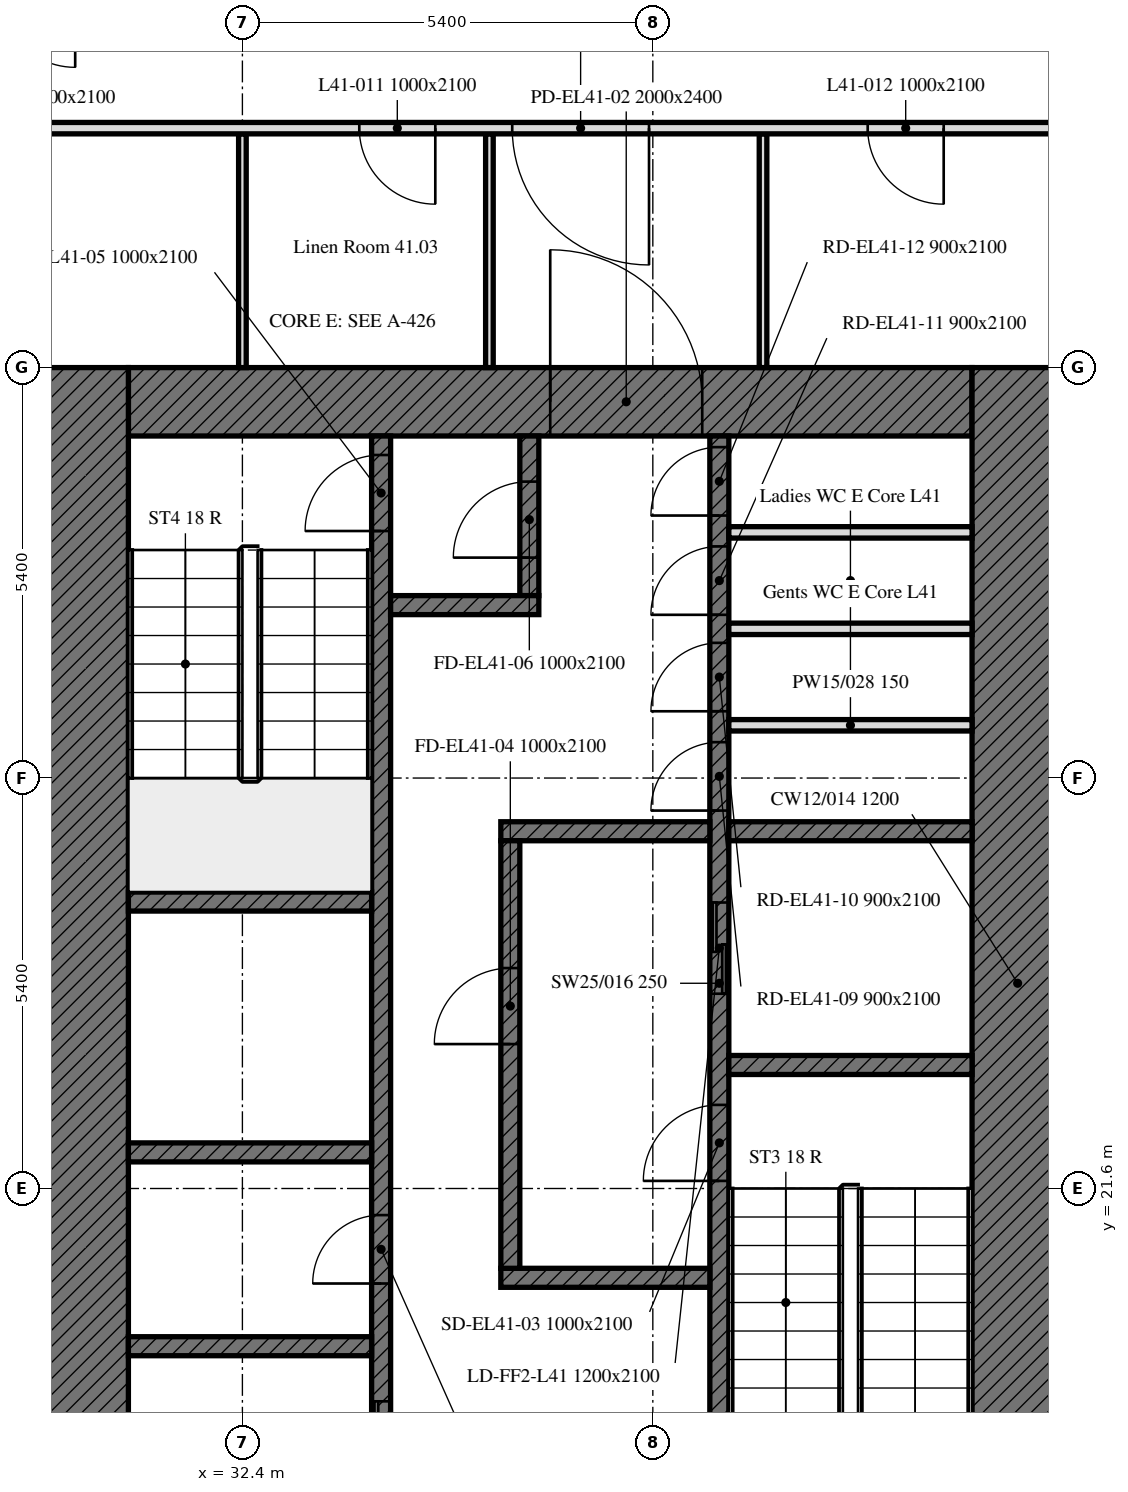
"""IFC4 building model, lengths in metres.
Left out: names, types, materials, properties, quantities, classifications, styles, units other than length and angle.
Written with IfcOpenShell. Run it as: python <this file> out.ifc"""

import sys

from ifc_helpers import new_model, si_unit, direction, frame, frame_2d, origin, place, context, subcontext, project, spatial, rectangle, extrude, element, fill, save


model = new_model("IFC4")
c1 = context("Model", 3, precision=1e-05, world=origin(), true_north=direction((0.0, 1.0)))
c2 = subcontext(c1, "Body", "Model", "MODEL_VIEW")
j1 = project(units=[si_unit("LENGTHUNIT", "METRE"), si_unit("PLANEANGLEUNIT", "RADIAN")], contexts=[c1])
p1 = place(None, origin())
s1 = spatial("IfcSite", under=j1, at=p1, CompositionType="ELEMENT")
p2 = place(p1, origin())
s2 = spatial("IfcBuilding", under=s1, at=p2, CompositionType="ELEMENT")
p3 = place(p2, frame((0.0, 0.0, 172.6)))
s3 = spatial("IfcBuildingStorey", under=s2, at=p3, CompositionType="ELEMENT", Elevation=172.6)
p4 = place(p3, frame((30.9, 31.95, 0.0), z_axis=(0.0, 0.0, 1.0), x_axis=(1.0, 0.0, 0.0)))
e1 = element("IfcWall", 1, at=p4, inside=s3, PredefinedType="SOLIDWALL", context=c2, shape_type="SweptSolid", body=[
    extrude(rectangle(XDim=11.1, YDim=0.9, at=frame_2d((5.55, 0.0))), origin(), (0.0, 0.0, 1.0), 2.8),
])
p5 = place(p4, frame((5.55, 0.0, 0.0)))
e2 = element("IfcOpeningElement", 2, at=p5, cuts=e1, PredefinedType="OPENING", context=c2, shape_type="SweptSolid", body=[
    extrude(rectangle(XDim=2.0, YDim=2.4, at=frame_2d((1.0, 1.2))), frame((0.0, 0.45, 0.0), z_axis=(0.0, -1.0, 0.0), x_axis=(1.0, 0.0, 0.0)), (0.0, 0.0, 1.0), 0.9),
])
for number, where, z_axis, x_axis in (
    (3, (42.6, 32.4, 0.0), (0.0, 0.0, 1.0), (0.0, -1.0, 0.0)),
    (4, (30.3, 16.2, 0.0), (0.0, 0.0, 1.0), (0.0, 1.0, 0.0)),
):
    element("IfcWall", number, at=place(p3, frame(where, z_axis=z_axis, x_axis=x_axis)), inside=s3, PredefinedType="SOLIDWALL", context=c2, shape_type="SweptSolid", body=[
        extrude(rectangle(XDim=16.2, YDim=1.2, at=frame_2d((8.1, 0.0))), origin(), (0.0, 0.0, 1.0), 2.8),
    ])
p6 = place(p3, frame((38.675, 17.1, 0.0), z_axis=(0.0, 0.0, 1.0), x_axis=(0.0, 1.0, 0.0)))
e5 = element("IfcWall", 5, at=p6, inside=s3, PredefinedType="SOLIDWALL", context=c2, shape_type="SweptSolid", body=[
    extrude(rectangle(XDim=14.4, YDim=0.25, at=frame_2d((7.2, 0.0))), origin(), (0.0, 0.0, 1.0), 2.8),
])
p7 = place(p6, frame((4.6, 0.0, 0.0)))
e6 = element("IfcOpeningElement", 6, at=p7, cuts=e5, PredefinedType="OPENING", context=c2, shape_type="SweptSolid", body=[
    extrude(rectangle(XDim=1.0, YDim=2.1, at=frame_2d((0.5, 1.05))), frame((0.0, 0.125, 0.0), z_axis=(0.0, -1.0, 0.0), x_axis=(1.0, 0.0, 0.0)), (0.0, 0.0, 1.0), 0.25),
])
p8 = place(p6, frame((7.062, 0.0, 0.0)))
e7 = element("IfcOpeningElement", 7, at=p8, cuts=e5, PredefinedType="OPENING", context=c2, shape_type="SweptSolid", body=[
    extrude(rectangle(XDim=1.2, YDim=2.1, at=frame_2d((0.6, 1.05))), frame((0.0, 0.125, 0.0), z_axis=(0.0, -1.0, 0.0), x_axis=(1.0, 0.0, 0.0)), (0.0, 0.0, 1.0), 0.25),
])
p9 = place(p6, frame((9.472, 0.0, 0.0)))
e8 = element("IfcOpeningElement", 8, at=p9, cuts=e5, PredefinedType="OPENING", context=c2, shape_type="SweptSolid", body=[
    extrude(rectangle(XDim=0.9, YDim=2.1, at=frame_2d((0.45, 1.05))), frame((0.0, 0.125, 0.0), z_axis=(0.0, -1.0, 0.0), x_axis=(1.0, 0.0, 0.0)), (0.0, 0.0, 1.0), 0.25),
])
p10 = place(p6, frame((10.779, 0.0, 0.0)))
e9 = element("IfcOpeningElement", 9, at=p10, cuts=e5, PredefinedType="OPENING", context=c2, shape_type="SweptSolid", body=[
    extrude(rectangle(XDim=0.9, YDim=2.1, at=frame_2d((0.45, 1.05))), frame((0.0, 0.125, 0.0), z_axis=(0.0, -1.0, 0.0), x_axis=(1.0, 0.0, 0.0)), (0.0, 0.0, 1.0), 0.25),
])
p11 = place(p6, frame((12.048, 0.0, 0.0)))
e10 = element("IfcOpeningElement", 10, at=p11, cuts=e5, PredefinedType="OPENING", context=c2, shape_type="SweptSolid", body=[
    extrude(rectangle(XDim=0.9, YDim=2.1, at=frame_2d((0.45, 1.05))), frame((0.0, 0.125, 0.0), z_axis=(0.0, -1.0, 0.0), x_axis=(1.0, 0.0, 0.0)), (0.0, 0.0, 1.0), 0.25),
])
p12 = place(p6, frame((13.354, 0.0, 0.0)))
e11 = element("IfcOpeningElement", 11, at=p12, cuts=e5, PredefinedType="OPENING", context=c2, shape_type="SweptSolid", body=[
    extrude(rectangle(XDim=0.9, YDim=2.1, at=frame_2d((0.45, 1.05))), frame((0.0, 0.125, 0.0), z_axis=(0.0, -1.0, 0.0), x_axis=(1.0, 0.0, 0.0)), (0.0, 0.0, 1.0), 0.25),
])
p13 = place(p3, frame((34.225, 17.1, 0.0), z_axis=(0.0, 0.0, 1.0), x_axis=(0.0, 1.0, 0.0)))
e12 = element("IfcWall", 12, at=p13, inside=s3, PredefinedType="SOLIDWALL", context=c2, shape_type="SweptSolid", body=[
    extrude(rectangle(XDim=14.4, YDim=0.25, at=frame_2d((7.2, 0.0))), origin(), (0.0, 0.0, 1.0), 2.8),
])
p14 = place(p13, frame((13.15, 0.0, 0.0)))
e13 = element("IfcOpeningElement", 13, at=p14, cuts=e12, PredefinedType="OPENING", context=c2, shape_type="SweptSolid", body=[
    extrude(rectangle(XDim=1.0, YDim=2.1, at=frame_2d((0.5, 1.05))), frame((0.0, 0.125, 0.0), z_axis=(0.0, -1.0, 0.0), x_axis=(1.0, 0.0, 0.0)), (0.0, 0.0, 1.0), 0.25),
])
p15 = place(p13, frame((0.6, 0.0, 0.0)))
e14 = element("IfcOpeningElement", 14, at=p15, cuts=e12, PredefinedType="OPENING", context=c2, shape_type="SweptSolid", body=[
    extrude(rectangle(XDim=1.1, YDim=2.1, at=frame_2d((0.55, 1.05))), frame((0.0, 0.125, 0.0), z_axis=(0.0, -1.0, 0.0), x_axis=(1.0, 0.0, 0.0)), (0.0, 0.0, 1.0), 0.25),
])
p16 = place(p13, frame((3.25, 0.0, 0.0)))
e15 = element("IfcOpeningElement", 15, at=p16, cuts=e12, PredefinedType="OPENING", context=c2, shape_type="SweptSolid", body=[
    extrude(rectangle(XDim=0.9, YDim=2.1, at=frame_2d((0.45, 1.05))), frame((0.0, 0.125, 0.0), z_axis=(0.0, -1.0, 0.0), x_axis=(1.0, 0.0, 0.0)), (0.0, 0.0, 1.0), 0.25),
])
p17 = place(p3, frame((38.8, 23.225, 0.0), z_axis=(0.0, 0.0, 1.0), x_axis=(1.0, 0.0, 0.0)))
e16 = element("IfcWall", 16, at=p17, inside=s3, PredefinedType="SOLIDWALL", context=c2, shape_type="SweptSolid", body=[
    extrude(rectangle(XDim=3.2, YDim=0.25, at=frame_2d((1.6, 0.0))), origin(), (0.0, 0.0, 1.0), 2.8),
])
for number, where, z_axis, x_axis in (
    (17, (30.9, 25.375, 0.0), (0.0, 0.0, 1.0), (1.0, 0.0, 0.0)),
    (18, (30.9, 22.075, 0.0), (0.0, 0.0, 1.0), (1.0, 0.0, 0.0)),
):
    element("IfcWall", number, at=place(p3, frame(where, z_axis=z_axis, x_axis=x_axis)), inside=s3, PredefinedType="SOLIDWALL", context=c2, shape_type="SweptSolid", body=[
        extrude(rectangle(XDim=3.2, YDim=0.25, at=frame_2d((1.6, 0.0))), origin(), (0.0, 0.0, 1.0), 2.8),
    ])
p18 = place(p3, frame((38.8, 26.3, 0.0), z_axis=(0.0, 0.0, 1.0), x_axis=(1.0, 0.0, 0.0)))
e19 = element("IfcWall", 19, at=p18, inside=s3, PredefinedType="SOLIDWALL", context=c2, shape_type="SweptSolid", body=[
    extrude(rectangle(XDim=3.2, YDim=0.25, at=frame_2d((1.6, 0.0))), origin(), (0.0, 0.0, 1.0), 2.8),
])
for number, where, z_axis, x_axis in (
    (20, (35.8, 26.3, 0.0), (0.0, 0.0, 1.0), (1.0, 0.0, 0.0)),
    (21, (35.8, 20.425, 0.0), (0.0, 0.0, 1.0), (1.0, 0.0, 0.0)),
):
    element("IfcWall", number, at=place(p3, frame(where, z_axis=z_axis, x_axis=x_axis)), inside=s3, PredefinedType="SOLIDWALL", context=c2, shape_type="SweptSolid", body=[
        extrude(rectangle(XDim=2.75, YDim=0.25, at=frame_2d((1.375, 0.0))), origin(), (0.0, 0.0, 1.0), 2.8),
    ])
p19 = place(p3, frame((36.175, 29.4, 0.0), z_axis=(0.0, 0.0, 1.0), x_axis=(0.0, 1.0, 0.0)))
e22 = element("IfcWall", 22, at=p19, inside=s3, PredefinedType="SOLIDWALL", context=c2, shape_type="SweptSolid", body=[
    extrude(rectangle(XDim=2.1, YDim=0.25, at=frame_2d((1.05, 0.0))), origin(), (0.0, 0.0, 1.0), 2.8),
])
p20 = place(p19, frame((0.5, 0.0, 0.0)))
e23 = element("IfcOpeningElement", 23, at=p20, cuts=e22, PredefinedType="OPENING", context=c2, shape_type="SweptSolid", body=[
    extrude(rectangle(XDim=1.0, YDim=2.1, at=frame_2d((0.5, 1.05))), frame((0.0, 0.125, 0.0), z_axis=(0.0, -1.0, 0.0), x_axis=(1.0, 0.0, 0.0)), (0.0, 0.0, 1.0), 0.25),
])
p21 = place(p3, frame((34.35, 29.275, 0.0), z_axis=(0.0, 0.0, 1.0), x_axis=(1.0, 0.0, 0.0)))
e24 = element("IfcWall", 24, at=p21, inside=s3, PredefinedType="SOLIDWALL", context=c2, shape_type="SweptSolid", body=[
    extrude(rectangle(XDim=1.95, YDim=0.25, at=frame_2d((0.975, 0.0))), origin(), (0.0, 0.0, 1.0), 2.8),
])
p22 = place(p3, frame((35.925, 20.55, 0.0), z_axis=(0.0, 0.0, 1.0), x_axis=(0.0, 1.0, 0.0)))
e25 = element("IfcWall", 25, at=p22, inside=s3, PredefinedType="SOLIDWALL", context=c2, shape_type="SweptSolid", body=[
    extrude(rectangle(XDim=5.625, YDim=0.25, at=frame_2d((2.812, 0.0))), origin(), (0.0, 0.0, 1.0), 2.8),
])
p23 = place(p22, frame((2.95, 0.0, 0.0)))
e26 = element("IfcOpeningElement", 26, at=p23, cuts=e25, PredefinedType="OPENING", context=c2, shape_type="SweptSolid", body=[
    extrude(rectangle(XDim=1.0, YDim=2.1, at=frame_2d((0.5, 1.05))), frame((0.0, 0.125, 0.0), z_axis=(0.0, -1.0, 0.0), x_axis=(1.0, 0.0, 0.0)), (0.0, 0.0, 1.0), 0.25),
])
p24 = place(p3, frame((30.9, 19.525, 0.0), z_axis=(0.0, 0.0, 1.0), x_axis=(1.0, 0.0, 0.0)))
e27 = element("IfcWall", 27, at=p24, inside=s3, PredefinedType="SOLIDWALL", context=c2, shape_type="SweptSolid", body=[
    extrude(rectangle(XDim=3.2, YDim=0.25, at=frame_2d((1.6, 0.0))), origin(), (0.0, 0.0, 1.0), 2.8),
])
for number, where, z_axis, x_axis in (
    (28, (38.8, 27.694, 0.0), (0.0, 0.0, 1.0), (1.0, 0.0, 0.0)),
    (29, (38.8, 28.963, 0.0), (0.0, 0.0, 1.0), (1.0, 0.0, 0.0)),
    (30, (38.8, 30.232, 0.0), (0.0, 0.0, 1.0), (1.0, 0.0, 0.0)),
):
    element("IfcWall", number, at=place(p3, frame(where, z_axis=z_axis, x_axis=x_axis)), inside=s3, PredefinedType="PARTITIONING", context=c2, shape_type="SweptSolid", body=[
        extrude(rectangle(XDim=3.2, YDim=0.15, at=frame_2d((1.6, 0.0))), origin(), (0.0, 0.0, 1.0), 2.8),
    ])
for number, where, z_axis, x_axis in (
    (31, (32.4, 32.4, 0.0), (0.0, 0.0, 1.0), (0.0, 1.0, 0.0)),
    (32, (35.65, 35.475, 0.0), (0.0, 0.0, 1.0), (0.0, -1.0, 0.0)),
    (33, (39.25, 32.4, 0.0), (0.0, 0.0, 1.0), (0.0, 1.0, 0.0)),
):
    element("IfcWall", number, at=place(p3, frame(where, z_axis=z_axis, x_axis=x_axis)), inside=s3, PredefinedType="PARTITIONING", context=c2, shape_type="SweptSolid", body=[
        extrude(rectangle(XDim=3.075, YDim=0.1, at=frame_2d((1.538, 0.0))), origin(), (0.0, 0.0, 1.0), 2.8),
    ])
p25 = place(p3, frame((43.275, 35.55, 0.0), z_axis=(0.0, 0.0, 1.0), x_axis=(-1.0, 0.0, 0.0)))
e34 = element("IfcWall", 34, at=p25, inside=s3, PredefinedType="PARTITIONING", context=c2, shape_type="SweptSolid", body=[
    extrude(rectangle(XDim=33.825, YDim=0.15, at=frame_2d((16.913, 0.0))), origin(), (0.0, 0.0, 1.0), 2.8),
])
p26 = place(p25, frame((23.875, 0.0, 0.0)))
e35 = element("IfcOpeningElement", 35, at=p26, cuts=e34, PredefinedType="OPENING", context=c2, shape_type="SweptSolid", body=[
    extrude(rectangle(XDim=1.0, YDim=2.1, at=frame_2d((0.5, 1.05))), frame((0.0, 0.075, 0.0), z_axis=(0.0, -1.0, 0.0), x_axis=(1.0, 0.0, 0.0)), (0.0, 0.0, 1.0), 0.15),
])
p27 = place(p25, frame((13.475, 0.0, 0.0)))
e36 = element("IfcOpeningElement", 36, at=p27, cuts=e34, PredefinedType="OPENING", context=c2, shape_type="SweptSolid", body=[
    extrude(rectangle(XDim=1.0, YDim=2.1, at=frame_2d((0.5, 1.05))), frame((0.0, 0.075, 0.0), z_axis=(0.0, -1.0, 0.0), x_axis=(1.0, 0.0, 0.0)), (0.0, 0.0, 1.0), 0.15),
])
p28 = place(p25, frame((8.337, 0.0, 0.0)))
e37 = element("IfcOpeningElement", 37, at=p28, cuts=e34, PredefinedType="OPENING", context=c2, shape_type="SweptSolid", body=[
    extrude(rectangle(XDim=1.0, YDim=2.1, at=frame_2d((0.5, 1.05))), frame((0.0, 0.075, 0.0), z_axis=(0.0, -1.0, 0.0), x_axis=(1.0, 0.0, 0.0)), (0.0, 0.0, 1.0), 0.15),
])
p29 = place(p25, frame((1.648, 0.0, 0.0)))
e38 = element("IfcOpeningElement", 38, at=p29, cuts=e34, PredefinedType="OPENING", context=c2, shape_type="SweptSolid", body=[
    extrude(rectangle(XDim=1.0, YDim=2.1, at=frame_2d((0.5, 1.05))), frame((0.0, 0.075, 0.0), z_axis=(0.0, -1.0, 0.0), x_axis=(1.0, 0.0, 0.0)), (0.0, 0.0, 1.0), 0.15),
])
p30 = place(p25, frame((28.613, 0.0, 0.0)))
e39 = element("IfcOpeningElement", 39, at=p30, cuts=e34, PredefinedType="OPENING", context=c2, shape_type="SweptSolid", body=[
    extrude(rectangle(XDim=1.0, YDim=2.1, at=frame_2d((0.5, 1.05))), frame((0.0, 0.075, 0.0), z_axis=(0.0, -1.0, 0.0), x_axis=(1.0, 0.0, 0.0)), (0.0, 0.0, 1.0), 0.15),
])
p31 = place(p25, frame((30.625, 0.0, 0.0)))
e40 = element("IfcOpeningElement", 40, at=p31, cuts=e34, PredefinedType="OPENING", context=c2, shape_type="SweptSolid", body=[
    extrude(rectangle(XDim=1.8, YDim=2.4, at=frame_2d((0.9, 1.2))), frame((0.0, 0.075, 0.0), z_axis=(0.0, -1.0, 0.0), x_axis=(1.0, 0.0, 0.0)), (0.0, 0.0, 1.0), 0.15),
])
p32 = place(p25, frame((5.525, 0.0, 0.0)))
e41 = element("IfcOpeningElement", 41, at=p32, cuts=e34, PredefinedType="OPENING", context=c2, shape_type="SweptSolid", body=[
    extrude(rectangle(XDim=1.8, YDim=2.4, at=frame_2d((0.9, 1.2))), frame((0.0, 0.075, 0.0), z_axis=(0.0, -1.0, 0.0), x_axis=(1.0, 0.0, 0.0)), (0.0, 0.0, 1.0), 0.15),
])
p33 = place(p5, origin())
e42 = element("IfcDoor", 42, at=p33, inside=s3, OperationType="DOUBLE_DOOR_SINGLE_SWING", PredefinedType="DOOR", context=c2, shape_type="SweptSolid", body=[
    extrude(rectangle(XDim=2.0, YDim=2.4, at=frame_2d((1.0, 1.2))), frame((0.0, 0.025, 0.0), z_axis=(0.0, -1.0, 0.0), x_axis=(1.0, 0.0, 0.0)), (0.0, 0.0, 1.0), 0.05),
])
fill(e2, e42)
p34 = place(p7, origin())
e43 = element("IfcDoor", 43, at=p34, inside=s3, OperationType="SINGLE_SWING_LEFT", PredefinedType="DOOR", context=c2, shape_type="SweptSolid", body=[
    extrude(rectangle(XDim=1.0, YDim=2.1, at=frame_2d((0.5, 1.05))), frame((0.0, 0.025, 0.0), z_axis=(0.0, -1.0, 0.0), x_axis=(1.0, 0.0, 0.0)), (0.0, 0.0, 1.0), 0.05),
])
fill(e6, e43)
p35 = place(p23, origin())
e44 = element("IfcDoor", 44, at=p35, inside=s3, OperationType="SINGLE_SWING_LEFT", PredefinedType="DOOR", context=c2, shape_type="SweptSolid", body=[
    extrude(rectangle(XDim=1.0, YDim=2.1, at=frame_2d((0.5, 1.05))), frame((0.0, 0.025, 0.0), z_axis=(0.0, -1.0, 0.0), x_axis=(1.0, 0.0, 0.0)), (0.0, 0.0, 1.0), 0.05),
])
fill(e26, e44)
p36 = place(p14, origin())
e45 = element("IfcDoor", 45, at=p36, inside=s3, OperationType="SINGLE_SWING_LEFT", PredefinedType="DOOR", context=c2, shape_type="SweptSolid", body=[
    extrude(rectangle(XDim=1.0, YDim=2.1, at=frame_2d((0.5, 1.05))), frame((0.0, 0.025, 0.0), z_axis=(0.0, -1.0, 0.0), x_axis=(1.0, 0.0, 0.0)), (0.0, 0.0, 1.0), 0.05),
])
fill(e13, e45)
p37 = place(p20, origin())
e46 = element("IfcDoor", 46, at=p37, inside=s3, OperationType="SINGLE_SWING_LEFT", PredefinedType="DOOR", context=c2, shape_type="SweptSolid", body=[
    extrude(rectangle(XDim=1.0, YDim=2.1, at=frame_2d((0.5, 1.05))), frame((0.0, 0.025, 0.0), z_axis=(0.0, -1.0, 0.0), x_axis=(1.0, 0.0, 0.0)), (0.0, 0.0, 1.0), 0.05),
])
fill(e23, e46)
p38 = place(p8, origin())
e47 = element("IfcDoor", 47, at=p38, inside=s3, OperationType="DOUBLE_DOOR_SLIDING", PredefinedType="DOOR", context=c2, shape_type="SweptSolid", body=[
    extrude(rectangle(XDim=1.2, YDim=2.1, at=frame_2d((0.6, 1.05))), frame((0.0, 0.025, 0.0), z_axis=(0.0, -1.0, 0.0), x_axis=(1.0, 0.0, 0.0)), (0.0, 0.0, 1.0), 0.05),
])
fill(e7, e47)
p39 = place(p15, origin())
e48 = element("IfcDoor", 48, at=p39, inside=s3, OperationType="DOUBLE_DOOR_SLIDING", PredefinedType="DOOR", context=c2, shape_type="SweptSolid", body=[
    extrude(rectangle(XDim=1.1, YDim=2.1, at=frame_2d((0.55, 1.05))), frame((0.0, 0.025, 0.0), z_axis=(0.0, -1.0, 0.0), x_axis=(1.0, 0.0, 0.0)), (0.0, 0.0, 1.0), 0.05),
])
fill(e14, e48)
p40 = place(p9, origin())
e49 = element("IfcDoor", 49, at=p40, inside=s3, OperationType="SINGLE_SWING_LEFT", PredefinedType="DOOR", context=c2, shape_type="SweptSolid", body=[
    extrude(rectangle(XDim=0.9, YDim=2.1, at=frame_2d((0.45, 1.05))), frame((0.0, 0.025, 0.0), z_axis=(0.0, -1.0, 0.0), x_axis=(1.0, 0.0, 0.0)), (0.0, 0.0, 1.0), 0.05),
])
fill(e8, e49)
p41 = place(p10, origin())
e50 = element("IfcDoor", 50, at=p41, inside=s3, OperationType="SINGLE_SWING_LEFT", PredefinedType="DOOR", context=c2, shape_type="SweptSolid", body=[
    extrude(rectangle(XDim=0.9, YDim=2.1, at=frame_2d((0.45, 1.05))), frame((0.0, 0.025, 0.0), z_axis=(0.0, -1.0, 0.0), x_axis=(1.0, 0.0, 0.0)), (0.0, 0.0, 1.0), 0.05),
])
fill(e9, e50)
p42 = place(p11, origin())
e51 = element("IfcDoor", 51, at=p42, inside=s3, OperationType="SINGLE_SWING_LEFT", PredefinedType="DOOR", context=c2, shape_type="SweptSolid", body=[
    extrude(rectangle(XDim=0.9, YDim=2.1, at=frame_2d((0.45, 1.05))), frame((0.0, 0.025, 0.0), z_axis=(0.0, -1.0, 0.0), x_axis=(1.0, 0.0, 0.0)), (0.0, 0.0, 1.0), 0.05),
])
fill(e10, e51)
p43 = place(p12, origin())
e52 = element("IfcDoor", 52, at=p43, inside=s3, OperationType="SINGLE_SWING_LEFT", PredefinedType="DOOR", context=c2, shape_type="SweptSolid", body=[
    extrude(rectangle(XDim=0.9, YDim=2.1, at=frame_2d((0.45, 1.05))), frame((0.0, 0.025, 0.0), z_axis=(0.0, -1.0, 0.0), x_axis=(1.0, 0.0, 0.0)), (0.0, 0.0, 1.0), 0.05),
])
fill(e11, e52)
p44 = place(p16, origin())
e53 = element("IfcDoor", 53, at=p44, inside=s3, OperationType="SINGLE_SWING_LEFT", PredefinedType="DOOR", context=c2, shape_type="SweptSolid", body=[
    extrude(rectangle(XDim=0.9, YDim=2.1, at=frame_2d((0.45, 1.05))), frame((0.0, 0.025, 0.0), z_axis=(0.0, -1.0, 0.0), x_axis=(1.0, 0.0, 0.0)), (0.0, 0.0, 1.0), 0.05),
])
fill(e15, e53)
p45 = place(p28, origin())
e54 = element("IfcDoor", 54, at=p45, inside=s3, OperationType="SINGLE_SWING_LEFT", PredefinedType="DOOR", context=c2, shape_type="SweptSolid", body=[
    extrude(rectangle(XDim=1.0, YDim=2.1, at=frame_2d((0.5, 1.05))), frame((0.0, 0.025, 0.0), z_axis=(0.0, -1.0, 0.0), x_axis=(1.0, 0.0, 0.0)), (0.0, 0.0, 1.0), 0.05),
])
fill(e37, e54)
p46 = place(p29, origin())
e55 = element("IfcDoor", 55, at=p46, inside=s3, OperationType="SINGLE_SWING_RIGHT", PredefinedType="DOOR", context=c2, shape_type="SweptSolid", body=[
    extrude(rectangle(XDim=1.0, YDim=2.1, at=frame_2d((0.5, 1.05))), frame((0.0, 0.025, 0.0), z_axis=(0.0, -1.0, 0.0), x_axis=(1.0, 0.0, 0.0)), (0.0, 0.0, 1.0), 0.05),
])
fill(e38, e55)
p47 = place(p32, origin())
e56 = element("IfcDoor", 56, at=p47, inside=s3, OperationType="DOUBLE_DOOR_SINGLE_SWING", PredefinedType="DOOR", context=c2, shape_type="SweptSolid", body=[
    extrude(rectangle(XDim=1.8, YDim=2.4, at=frame_2d((0.9, 1.2))), frame((0.0, 0.025, 0.0), z_axis=(0.0, -1.0, 0.0), x_axis=(1.0, 0.0, 0.0)), (0.0, 0.0, 1.0), 0.05),
])
fill(e41, e56)
save(model, sys.argv[1])
